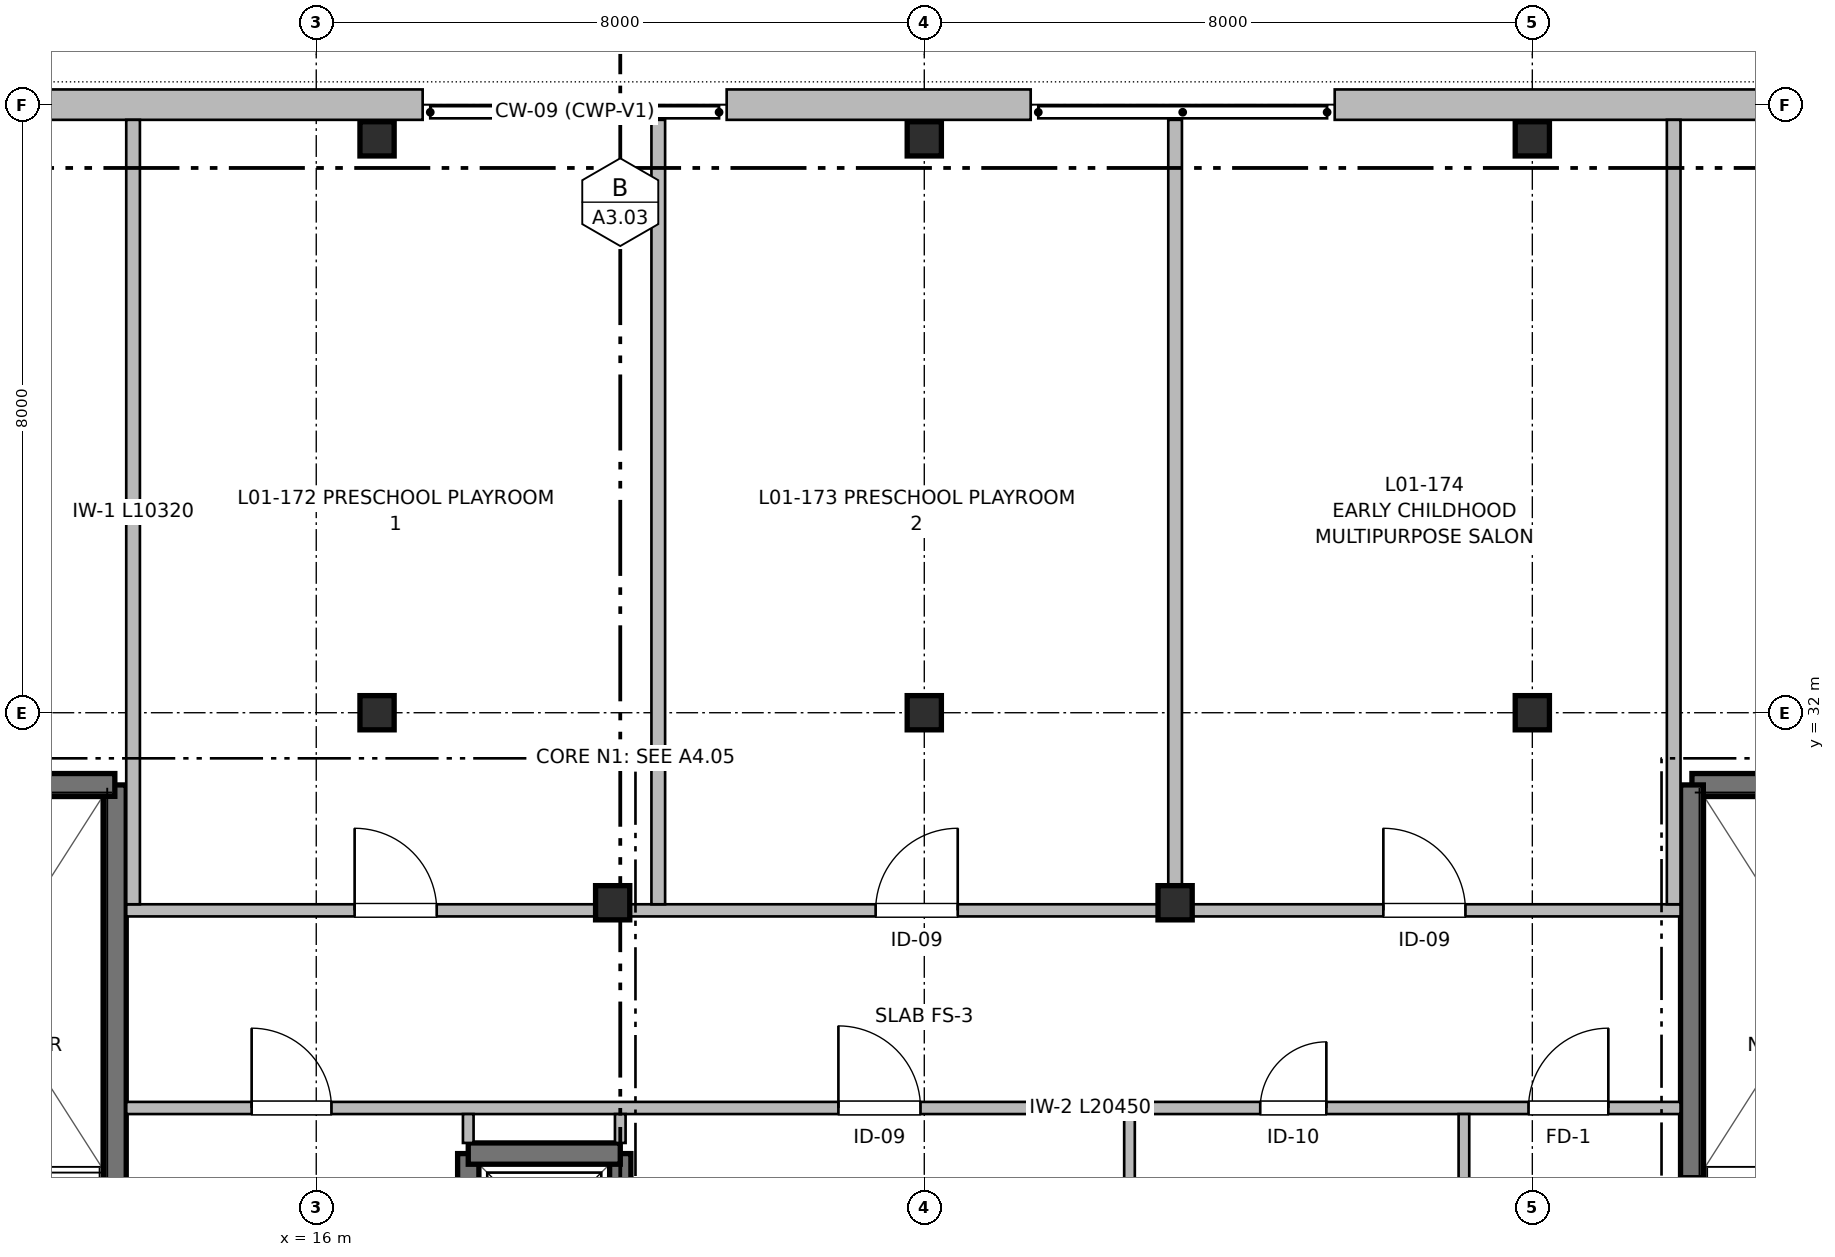
"""IFC4 building model, lengths in metres.
Left out: names, types, materials, properties, quantities, classifications, styles, units other than length and angle.
Written with IfcOpenShell. Run it as: python <this file> out.ifc"""

import sys

from ifc_helpers import new_model, si_unit, direction, frame, frame_2d, origin, origin_2d, place, context, subcontext, project, spatial, rectangle, extrude, element, fill, save


model = new_model("IFC4")
c1 = context("Model", 3, precision=1e-05, world=origin(), true_north=direction((0.0, 1.0)))
c2 = subcontext(c1, "Body", "Model", "MODEL_VIEW")
j1 = project(units=[si_unit("LENGTHUNIT", "METRE"), si_unit("PLANEANGLEUNIT", "RADIAN")], contexts=[c1])
p1 = place(None, origin())
s1 = spatial("IfcSite", under=j1, at=p1, CompositionType="ELEMENT")
p2 = place(p1, origin())
s2 = spatial("IfcBuilding", under=s1, at=p2, CompositionType="ELEMENT")
p3 = place(p2, frame((0.0, 0.0, 4.16)))
s3 = spatial("IfcBuildingStorey", under=s2, at=p3, CompositionType="ELEMENT", Elevation=4.16)
for number, where, z_axis, x_axis in (
    (1, (16.8, 32.0, 0.0), (0.0, 0.0, 1.0), (1.0, 0.0, 0.0)),
    (2, (16.8, 39.55, 0.0), (0.0, 0.0, 1.0), (1.0, 0.0, 0.0)),
):
    element("IfcColumn", number, at=place(p3, frame(where, z_axis=z_axis, x_axis=x_axis)), inside=s3, PredefinedType="COLUMN", context=c2, shape_type="SweptSolid", body=[
        extrude(rectangle(XDim=0.45, YDim=0.45, at=origin_2d()), origin(), (0.0, 0.0, 1.0), 3.2),
    ])
p4 = place(p3, frame((19.9, 29.5, 0.0), z_axis=(0.0, 0.0, 1.0), x_axis=(1.0, 0.0, 0.0)))
e3 = element("IfcColumn", 3, at=p4, inside=s3, PredefinedType="COLUMN", context=c2, shape_type="SweptSolid", body=[
    extrude(rectangle(XDim=0.45, YDim=0.45, at=origin_2d()), origin(), (0.0, 0.0, 1.0), 4.89),
])
for number, where, z_axis, x_axis in (
    (4, (24.0, 32.0, 0.0), (0.0, 0.0, 1.0), (1.0, 0.0, 0.0)),
    (5, (24.0, 39.55, 0.0), (0.0, 0.0, 1.0), (1.0, 0.0, 0.0)),
):
    element("IfcColumn", number, at=place(p3, frame(where, z_axis=z_axis, x_axis=x_axis)), inside=s3, PredefinedType="COLUMN", context=c2, shape_type="SweptSolid", body=[
        extrude(rectangle(XDim=0.45, YDim=0.45, at=origin_2d()), origin(), (0.0, 0.0, 1.0), 3.2),
    ])
p5 = place(p3, frame((27.3, 29.5, 0.0), z_axis=(0.0, 0.0, 1.0), x_axis=(1.0, 0.0, 0.0)))
e6 = element("IfcColumn", 6, at=p5, inside=s3, PredefinedType="COLUMN", context=c2, shape_type="SweptSolid", body=[
    extrude(rectangle(XDim=0.45, YDim=0.45, at=origin_2d()), origin(), (0.0, 0.0, 1.0), 4.89),
])
for number, where, z_axis, x_axis in (
    (7, (32.0, 32.0, 0.0), (0.0, 0.0, 1.0), (1.0, 0.0, 0.0)),
    (8, (32.0, 39.55, 0.0), (0.0, 0.0, 1.0), (1.0, 0.0, 0.0)),
):
    element("IfcColumn", number, at=place(p3, frame(where, z_axis=z_axis, x_axis=x_axis)), inside=s3, PredefinedType="COLUMN", context=c2, shape_type="SweptSolid", body=[
        extrude(rectangle(XDim=0.45, YDim=0.45, at=origin_2d()), origin(), (0.0, 0.0, 1.0), 3.2),
    ])
p6 = place(p3, frame((8.0, 40.0, 0.0), z_axis=(0.0, 0.0, 1.0), x_axis=(1.0, 0.0, 0.0)))
e9 = element("IfcWall", 9, at=p6, inside=s3, PredefinedType="SOLIDWALL", context=c2, shape_type="SweptSolid", body=[
    extrude(rectangle(XDim=9.4, YDim=0.4, at=frame_2d((4.7, 0.0))), origin(), (0.0, 0.0, 1.0), 3.06),
])
p7 = place(p3, frame((21.4, 40.0, 0.0), z_axis=(0.0, 0.0, 1.0), x_axis=(1.0, 0.0, 0.0)))
e10 = element("IfcWall", 10, at=p7, inside=s3, PredefinedType="SOLIDWALL", context=c2, shape_type="SweptSolid", body=[
    extrude(rectangle(XDim=4.0, YDim=0.4, at=frame_2d((2.0, 0.0))), origin(), (0.0, 0.0, 1.0), 3.06),
])
p8 = place(p3, frame((29.4, 40.0, 0.0), z_axis=(0.0, 0.0, 1.0), x_axis=(1.0, 0.0, 0.0)))
e11 = element("IfcWall", 11, at=p8, inside=s3, PredefinedType="SOLIDWALL", context=c2, shape_type="SweptSolid", body=[
    extrude(rectangle(XDim=10.6, YDim=0.4, at=frame_2d((5.3, 0.0))), origin(), (0.0, 0.0, 1.0), 3.06),
])
p9 = place(p3, frame((13.35, 31.05, 0.0), z_axis=(0.0, 0.0, 1.0), x_axis=(0.0, -1.0, 0.0)))
e12 = element("IfcWall", 12, at=p9, inside=s3, PredefinedType="SHEAR", context=c2, shape_type="SweptSolid", body=[
    extrude(rectangle(XDim=6.9, YDim=0.3, at=frame_2d((3.45, 0.0))), origin(), (0.0, 0.0, 1.0), 3.2),
])
p10 = place(p9, frame((5.35, 0.0, 0.0)))
e13 = element("IfcOpeningElement", 13, at=p10, cuts=e12, PredefinedType="OPENING", context=c2, shape_type="SweptSolid", body=[
    extrude(rectangle(XDim=1.05, YDim=2.15, at=frame_2d((0.525, 1.075))), frame((0.0, 0.16, 0.0), z_axis=(0.0, -1.0, 0.0), x_axis=(1.0, 0.0, 0.0)), (0.0, 0.0, 1.0), 0.32),
])
p11 = place(p3, frame((9.9, 31.05, 0.0), z_axis=(0.0, 0.0, 1.0), x_axis=(1.0, 0.0, 0.0)))
e14 = element("IfcWall", 14, at=p11, inside=s3, PredefinedType="SHEAR", context=c2, shape_type="SweptSolid", body=[
    extrude(rectangle(XDim=3.45, YDim=0.3, at=frame_2d((1.725, 0.0))), origin(), (0.0, 0.0, 1.0), 3.2),
])
p12 = place(p3, frame((34.1, 31.05, 0.0), z_axis=(0.0, 0.0, 1.0), x_axis=(1.0, 0.0, 0.0)))
e15 = element("IfcWall", 15, at=p12, inside=s3, PredefinedType="SHEAR", context=c2, shape_type="SweptSolid", body=[
    extrude(rectangle(XDim=3.45, YDim=0.3, at=frame_2d((1.725, 0.0))), origin(), (0.0, 0.0, 1.0), 3.2),
])
p13 = place(p3, frame((34.1, 24.15, 0.0), z_axis=(0.0, 0.0, 1.0), x_axis=(0.0, 1.0, 0.0)))
e16 = element("IfcWall", 16, at=p13, inside=s3, PredefinedType="SHEAR", context=c2, shape_type="SweptSolid", body=[
    extrude(rectangle(XDim=6.9, YDim=0.3, at=frame_2d((3.45, 0.0))), origin(), (0.0, 0.0, 1.0), 3.2),
])
p14 = place(p13, frame((0.7, 0.0, 0.0)))
e17 = element("IfcOpeningElement", 17, at=p14, cuts=e16, PredefinedType="OPENING", context=c2, shape_type="SweptSolid", body=[
    extrude(rectangle(XDim=1.05, YDim=2.15, at=frame_2d((0.525, 1.075))), frame((0.0, 0.16, 0.0), z_axis=(0.0, -1.0, 0.0), x_axis=(1.0, 0.0, 0.0)), (0.0, 0.0, 1.0), 0.32),
])
p15 = place(p3, frame((20.0, 24.2, 0.0), z_axis=(0.0, 0.0, 1.0), x_axis=(0.0, 1.0, 0.0)))
e18 = element("IfcWall", 18, at=p15, inside=s3, PredefinedType="SHEAR", context=c2, shape_type="SweptSolid", body=[
    extrude(rectangle(XDim=2.0, YDim=0.28, at=frame_2d((1.0, 0.0))), origin(), (0.0, 0.0, 1.0), 3.06),
])
p16 = place(p15, frame((0.5, 0.0, 0.0)))
e19 = element("IfcOpeningElement", 19, at=p16, cuts=e18, PredefinedType="OPENING", context=c2, shape_type="SweptSolid", body=[
    extrude(rectangle(XDim=0.95, YDim=2.15, at=frame_2d((0.475, 1.075))), frame((0.0, 0.15, 0.0), z_axis=(0.0, -1.0, 0.0), x_axis=(1.0, 0.0, 0.0)), (0.0, 0.0, 1.0), 0.3),
])
for number, where, z_axis, x_axis in (
    (20, (18.0, 24.2, 0.0), (0.0, 0.0, 1.0), (0.0, 1.0, 0.0)),
    (21, (18.0, 26.2, 0.0), (0.0, 0.0, 1.0), (1.0, 0.0, 0.0)),
):
    element("IfcWall", number, at=place(p3, frame(where, z_axis=z_axis, x_axis=x_axis)), inside=s3, PredefinedType="SHEAR", context=c2, shape_type="SweptSolid", body=[
        extrude(rectangle(XDim=2.0, YDim=0.28, at=frame_2d((1.0, 0.0))), origin(), (0.0, 0.0, 1.0), 3.06),
    ])
p17 = place(p3, frame((13.5, 26.8, 0.0), z_axis=(0.0, 0.0, 1.0), x_axis=(1.0, 0.0, 0.0)))
e22 = element("IfcWall", 22, at=p17, inside=s3, PredefinedType="PARTITIONING", context=c2, shape_type="SweptSolid", body=[
    extrude(rectangle(XDim=20.45, YDim=0.16, at=frame_2d((10.225, 0.0))), origin(), (0.0, 0.0, 1.0), 2.94),
])
p18 = place(p17, frame((1.65, 0.0, 0.0)))
e23 = element("IfcOpeningElement", 23, at=p18, cuts=e22, PredefinedType="OPENING", context=c2, shape_type="SweptSolid", body=[
    extrude(rectangle(XDim=1.05, YDim=2.15, at=frame_2d((0.525, 1.075))), frame((0.0, 0.09, 0.0), z_axis=(0.0, -1.0, 0.0), x_axis=(1.0, 0.0, 0.0)), (0.0, 0.0, 1.0), 0.18),
])
p19 = place(p17, frame((18.45, 0.0, 0.0)))
e24 = element("IfcOpeningElement", 24, at=p19, cuts=e22, PredefinedType="OPENING", context=c2, shape_type="SweptSolid", body=[
    extrude(rectangle(XDim=1.05, YDim=2.15, at=frame_2d((0.525, 1.075))), frame((0.0, 0.09, 0.0), z_axis=(0.0, -1.0, 0.0), x_axis=(1.0, 0.0, 0.0)), (0.0, 0.0, 1.0), 0.18),
])
p20 = place(p17, frame((9.37, 0.0, 0.0)))
e25 = element("IfcOpeningElement", 25, at=p20, cuts=e22, PredefinedType="OPENING", context=c2, shape_type="SweptSolid", body=[
    extrude(rectangle(XDim=1.08, YDim=2.15, at=frame_2d((0.54, 1.075))), frame((0.0, 0.09, 0.0), z_axis=(0.0, -1.0, 0.0), x_axis=(1.0, 0.0, 0.0)), (0.0, 0.0, 1.0), 0.18),
])
p21 = place(p17, frame((14.92, 0.0, 0.0)))
e26 = element("IfcOpeningElement", 26, at=p21, cuts=e22, PredefinedType="OPENING", context=c2, shape_type="SweptSolid", body=[
    extrude(rectangle(XDim=0.87, YDim=2.05, at=frame_2d((0.435, 1.025))), frame((0.0, 0.09, 0.0), z_axis=(0.0, -1.0, 0.0), x_axis=(1.0, 0.0, 0.0)), (0.0, 0.0, 1.0), 0.18),
])
p22 = place(p3, frame((13.5, 29.4, 0.0), z_axis=(0.0, 0.0, 1.0), x_axis=(1.0, 0.0, 0.0)))
e27 = element("IfcWall", 27, at=p22, inside=s3, PredefinedType="PARTITIONING", context=c2, shape_type="SweptSolid", body=[
    extrude(rectangle(XDim=20.45, YDim=0.16, at=frame_2d((10.225, 0.0))), origin(), (0.0, 0.0, 1.0), 2.94),
])
p23 = place(p22, frame((3.005, 0.0, 0.0)))
e28 = element("IfcOpeningElement", 28, at=p23, cuts=e27, PredefinedType="OPENING", context=c2, shape_type="SweptSolid", body=[
    extrude(rectangle(XDim=1.08, YDim=2.15, at=frame_2d((0.54, 1.075))), frame((0.0, 0.09, 0.0), z_axis=(0.0, -1.0, 0.0), x_axis=(1.0, 0.0, 0.0)), (0.0, 0.0, 1.0), 0.18),
])
p24 = place(p22, frame((9.86, 0.0, 0.0)))
e29 = element("IfcOpeningElement", 29, at=p24, cuts=e27, PredefinedType="OPENING", context=c2, shape_type="SweptSolid", body=[
    extrude(rectangle(XDim=1.08, YDim=2.15, at=frame_2d((0.54, 1.075))), frame((0.0, 0.09, 0.0), z_axis=(0.0, -1.0, 0.0), x_axis=(1.0, 0.0, 0.0)), (0.0, 0.0, 1.0), 0.18),
])
p25 = place(p22, frame((16.54, 0.0, 0.0)))
e30 = element("IfcOpeningElement", 30, at=p25, cuts=e27, PredefinedType="OPENING", context=c2, shape_type="SweptSolid", body=[
    extrude(rectangle(XDim=1.08, YDim=2.15, at=frame_2d((0.54, 1.075))), frame((0.0, 0.09, 0.0), z_axis=(0.0, -1.0, 0.0), x_axis=(1.0, 0.0, 0.0)), (0.0, 0.0, 1.0), 0.18),
])
for number, where, z_axis, x_axis in (
    (31, (18.0, 26.34, 0.0), (0.0, 0.0, 1.0), (0.0, 1.0, 0.0)),
    (32, (20.0, 26.34, 0.0), (0.0, 0.0, 1.0), (0.0, 1.0, 0.0)),
):
    element("IfcWall", number, at=place(p3, frame(where, z_axis=z_axis, x_axis=x_axis)), inside=s3, PredefinedType="PARTITIONING", context=c2, shape_type="SweptSolid", body=[
        extrude(rectangle(XDim=0.38, YDim=0.14, at=frame_2d((0.19, 0.0))), origin(), (0.0, 0.0, 1.0), 2.94),
    ])
p26 = place(p3, frame((31.1, 16.2, 0.0), z_axis=(0.0, 0.0, 1.0), x_axis=(0.0, 1.0, 0.0)))
e33 = element("IfcWall", 33, at=p26, inside=s3, PredefinedType="PARTITIONING", context=c2, shape_type="SweptSolid", body=[
    extrude(rectangle(XDim=10.52, YDim=0.14, at=frame_2d((5.26, 0.0))), origin(), (0.0, 0.0, 1.0), 2.94),
])
for number, where, z_axis, x_axis in (
    (34, (13.59, 29.48, 0.0), (0.0, 0.0, 1.0), (0.0, 1.0, 0.0)),
    (35, (20.5, 29.48, 0.0), (0.0, 0.0, 1.0), (0.0, 1.0, 0.0)),
    (36, (27.3, 29.48, 0.0), (0.0, 0.0, 1.0), (0.0, 1.0, 0.0)),
    (37, (33.86, 29.48, 0.0), (0.0, 0.0, 1.0), (0.0, 1.0, 0.0)),
):
    element("IfcWall", number, at=place(p3, frame(where, z_axis=z_axis, x_axis=x_axis)), inside=s3, PredefinedType="PARTITIONING", context=c2, shape_type="SweptSolid", body=[
        extrude(rectangle(XDim=10.32, YDim=0.18, at=frame_2d((5.16, 0.0))), origin(), (0.0, 0.0, 1.0), 2.94),
    ])
p27 = place(p3, frame((26.7, 16.2, 0.0), z_axis=(0.0, 0.0, 1.0), x_axis=(0.0, 1.0, 0.0)))
e38 = element("IfcWall", 38, at=p27, inside=s3, PredefinedType="PARTITIONING", context=c2, shape_type="SweptSolid", body=[
    extrude(rectangle(XDim=10.52, YDim=0.14, at=frame_2d((5.26, 0.0))), origin(), (0.0, 0.0, 1.0), 2.94),
])
p28 = place(p14, origin())
e39 = element("IfcDoor", 39, at=p28, inside=s3, OperationType="SINGLE_SWING_LEFT", PredefinedType="DOOR", context=c2, shape_type="SweptSolid", body=[
    extrude(rectangle(XDim=1.05, YDim=2.15, at=frame_2d((0.525, 1.075))), frame((0.0, 0.025, 0.0), z_axis=(0.0, -1.0, 0.0), x_axis=(1.0, 0.0, 0.0)), (0.0, 0.0, 1.0), 0.05),
])
fill(e17, e39)
p29 = place(p18, origin())
e40 = element("IfcDoor", 40, at=p29, inside=s3, OperationType="SINGLE_SWING_LEFT", PredefinedType="DOOR", context=c2, shape_type="SweptSolid", body=[
    extrude(rectangle(XDim=1.05, YDim=2.15, at=frame_2d((0.525, 1.075))), frame((0.0, 0.025, 0.0), z_axis=(0.0, -1.0, 0.0), x_axis=(1.0, 0.0, 0.0)), (0.0, 0.0, 1.0), 0.05),
])
fill(e23, e40)
p30 = place(p19, origin())
e41 = element("IfcDoor", 41, at=p30, inside=s3, OperationType="SINGLE_SWING_RIGHT", PredefinedType="DOOR", context=c2, shape_type="SweptSolid", body=[
    extrude(rectangle(XDim=1.05, YDim=2.15, at=frame_2d((0.525, 1.075))), frame((0.0, 0.025, 0.0), z_axis=(0.0, -1.0, 0.0), x_axis=(1.0, 0.0, 0.0)), (0.0, 0.0, 1.0), 0.05),
])
fill(e24, e41)
p31 = place(p23, origin())
e42 = element("IfcDoor", 42, at=p31, inside=s3, OperationType="SINGLE_SWING_LEFT", PredefinedType="DOOR", context=c2, shape_type="SweptSolid", body=[
    extrude(rectangle(XDim=1.08, YDim=2.15, at=frame_2d((0.54, 1.075))), frame((0.0, 0.025, 0.0), z_axis=(0.0, -1.0, 0.0), x_axis=(1.0, 0.0, 0.0)), (0.0, 0.0, 1.0), 0.05),
])
fill(e28, e42)
p32 = place(p24, origin())
e43 = element("IfcDoor", 43, at=p32, inside=s3, OperationType="SINGLE_SWING_RIGHT", PredefinedType="DOOR", context=c2, shape_type="SweptSolid", body=[
    extrude(rectangle(XDim=1.08, YDim=2.15, at=frame_2d((0.54, 1.075))), frame((0.0, 0.025, 0.0), z_axis=(0.0, -1.0, 0.0), x_axis=(1.0, 0.0, 0.0)), (0.0, 0.0, 1.0), 0.05),
])
fill(e29, e43)
p33 = place(p25, origin())
e44 = element("IfcDoor", 44, at=p33, inside=s3, OperationType="SINGLE_SWING_LEFT", PredefinedType="DOOR", context=c2, shape_type="SweptSolid", body=[
    extrude(rectangle(XDim=1.08, YDim=2.15, at=frame_2d((0.54, 1.075))), frame((0.0, 0.025, 0.0), z_axis=(0.0, -1.0, 0.0), x_axis=(1.0, 0.0, 0.0)), (0.0, 0.0, 1.0), 0.05),
])
fill(e30, e44)
p34 = place(p20, origin())
e45 = element("IfcDoor", 45, at=p34, inside=s3, OperationType="SINGLE_SWING_LEFT", PredefinedType="DOOR", context=c2, shape_type="SweptSolid", body=[
    extrude(rectangle(XDim=1.08, YDim=2.15, at=frame_2d((0.54, 1.075))), frame((0.0, 0.025, 0.0), z_axis=(0.0, -1.0, 0.0), x_axis=(1.0, 0.0, 0.0)), (0.0, 0.0, 1.0), 0.05),
])
fill(e25, e45)
p35 = place(p21, origin())
e46 = element("IfcDoor", 46, at=p35, inside=s3, OperationType="SINGLE_SWING_RIGHT", PredefinedType="DOOR", context=c2, shape_type="SweptSolid", body=[
    extrude(rectangle(XDim=0.87, YDim=2.05, at=frame_2d((0.435, 1.025))), frame((0.0, 0.025, 0.0), z_axis=(0.0, -1.0, 0.0), x_axis=(1.0, 0.0, 0.0)), (0.0, 0.0, 1.0), 0.05),
])
fill(e26, e46)
save(model, sys.argv[1])
